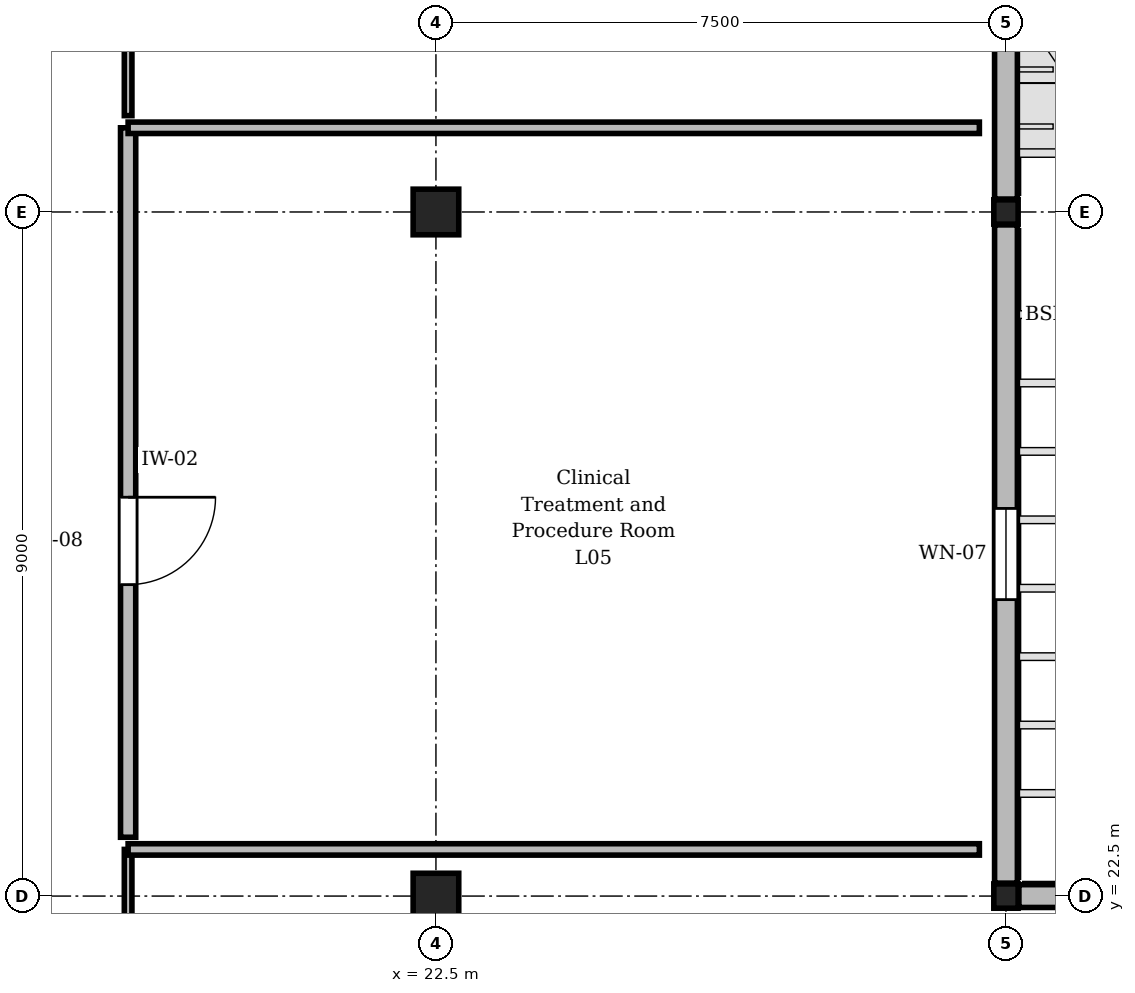
"""IFC4 building model, lengths in metres.
Left out: names, types, materials, properties, quantities, classifications, styles, units other than length and angle.
Written with IfcOpenShell. Run it as: python <this file> out.ifc"""

import sys

from ifc_helpers import new_model, si_unit, direction, frame, frame_2d, origin, origin_2d, place, context, subcontext, project, spatial, rectangle, circle, extrude, element, fill, save


model = new_model("IFC4")
c1 = context("Model", 3, precision=1e-05, world=origin(), true_north=direction((0.0, 1.0)))
c2 = subcontext(c1, "Body", "Model", "MODEL_VIEW")
j1 = project(units=[si_unit("LENGTHUNIT", "METRE"), si_unit("PLANEANGLEUNIT", "RADIAN")], contexts=[c1])
p1 = place(None, origin())
s1 = spatial("IfcSite", under=j1, at=p1, CompositionType="ELEMENT")
p2 = place(p1, origin())
s2 = spatial("IfcBuilding", under=s1, at=p2, CompositionType="ELEMENT")
p3 = place(p2, frame((0.0, 0.0, 21.9)))
s3 = spatial("IfcBuildingStorey", under=s2, at=p3, CompositionType="ELEMENT", Elevation=21.9)
p4 = place(p3, frame((22.5, 22.5, 0.0), z_axis=(0.0, 0.0, 1.0), x_axis=(1.0, 0.0, 0.0)))
e1 = element("IfcColumn", 1, at=p4, inside=s3, PredefinedType="COLUMN", context=c2, shape_type="SweptSolid", body=[
    extrude(circle(Radius=0.3, at=origin_2d()), origin(), (0.0, 0.0, 1.0), 4.05),
])
p5 = place(p3, frame((22.5, 31.5, 0.0), z_axis=(0.0, 0.0, 1.0), x_axis=(1.0, 0.0, 0.0)))
e2 = element("IfcColumn", 2, at=p5, inside=s3, PredefinedType="COLUMN", context=c2, shape_type="SweptSolid", body=[
    extrude(rectangle(XDim=0.6, YDim=0.6, at=origin_2d()), origin(), (0.0, 0.0, 1.0), 4.05),
])
for number, where, z_axis, x_axis in (
    (3, (30.0, 22.5, 0.0), (0.0, 0.0, 1.0), (1.0, 0.0, 0.0)),
    (4, (30.0, 31.5, 0.0), (0.0, 0.0, 1.0), (1.0, 0.0, 0.0)),
):
    element("IfcColumn", number, at=place(p3, frame(where, z_axis=z_axis, x_axis=x_axis)), inside=s3, PredefinedType="COLUMN", context=c2, shape_type="SweptSolid", body=[
        extrude(rectangle(XDim=0.32, YDim=0.32, at=origin_2d()), origin(), (0.0, 0.0, 1.0), 4.05),
    ])
p6 = place(p3, frame((30.0, 31.33, 0.0), z_axis=(0.0, 0.0, 1.0), x_axis=(0.0, -1.0, 0.0)))
e5 = element("IfcWall", 5, at=p6, inside=s3, PredefinedType="STANDARD", context=c2, shape_type="SweptSolid", body=[
    extrude(rectangle(XDim=8.66, YDim=0.3, at=frame_2d((4.33, 0.0))), origin(), (0.0, 0.0, 1.0), 3.22),
])
p7 = place(p6, frame((3.73, 0.0, 0.9)))
e6 = element("IfcOpeningElement", 6, at=p7, cuts=e5, PredefinedType="OPENING", context=c2, shape_type="SweptSolid", body=[
    extrude(rectangle(XDim=1.2, YDim=2.04, at=frame_2d((0.6, 1.02))), frame((0.0, 0.16, 0.0), z_axis=(0.0, -1.0, 0.0), x_axis=(1.0, 0.0, 0.0)), (0.0, 0.0, 1.0), 0.32),
])
p8 = place(p3, frame((30.0, 38.83, 0.0), z_axis=(0.0, 0.0, 1.0), x_axis=(0.0, -1.0, 0.0)))
e7 = element("IfcWall", 7, at=p8, inside=s3, PredefinedType="STANDARD", context=c2, shape_type="SweptSolid", body=[
    extrude(rectangle(XDim=7.16, YDim=0.3, at=frame_2d((3.58, 0.0))), origin(), (0.0, 0.0, 1.0), 3.17),
])
p9 = place(p8, frame((2.53, 0.0, 0.9)))
e8 = element("IfcOpeningElement", 8, at=p9, cuts=e7, PredefinedType="OPENING", context=c2, shape_type="SweptSolid", body=[
    extrude(rectangle(XDim=2.1, YDim=1.99, at=frame_2d((1.05, 0.995))), frame((0.0, 0.16, 0.0), z_axis=(0.0, -1.0, 0.0), x_axis=(1.0, 0.0, 0.0)), (0.0, 0.0, 1.0), 0.32),
])
p10 = place(p3, frame((30.17, 22.5, 0.0), z_axis=(0.0, 0.0, 1.0), x_axis=(1.0, 0.0, 0.0)))
e9 = element("IfcWall", 9, at=p10, inside=s3, PredefinedType="STANDARD", context=c2, shape_type="SweptSolid", body=[
    extrude(rectangle(XDim=7.18, YDim=0.3, at=frame_2d((3.59, 0.0))), origin(), (0.0, 0.0, 1.0), 3.17),
])
p11 = place(p10, frame((2.99, 0.0, 0.9)))
e10 = element("IfcOpeningElement", 10, at=p11, cuts=e9, PredefinedType="OPENING", context=c2, shape_type="SweptSolid", body=[
    extrude(rectangle(XDim=1.2, YDim=1.99, at=frame_2d((0.6, 0.995))), frame((0.0, 0.16, 0.0), z_axis=(0.0, -1.0, 0.0), x_axis=(1.0, 0.0, 0.0)), (0.0, 0.0, 1.0), 0.32),
])
p12 = place(p3, frame((18.45, 23.114, 0.0), z_axis=(0.0, 0.0, 1.0), x_axis=(0.0, -1.0, 0.0)))
e11 = element("IfcWall", 11, at=p12, inside=s3, PredefinedType="PARTITIONING", context=c2, shape_type="SweptSolid", body=[
    extrude(rectangle(XDim=9.334, YDim=0.1, at=frame_2d((4.667, 0.0))), origin(), (0.0, 0.0, 1.0), 3.355),
])
p13 = place(p12, frame((4.092, 0.0, 0.0)))
e12 = element("IfcOpeningElement", 12, at=p13, cuts=e11, PredefinedType="OPENING", context=c2, shape_type="SweptSolid", body=[
    extrude(rectangle(XDim=1.15, YDim=2.2, at=frame_2d((0.575, 1.1))), frame((0.0, 0.06, 0.0), z_axis=(0.0, -1.0, 0.0), x_axis=(1.0, 0.0, 0.0)), (0.0, 0.0, 1.0), 0.12),
])
p14 = place(p3, frame((18.45, 32.607, 0.0), z_axis=(0.0, 0.0, 1.0), x_axis=(0.0, -1.0, 0.0)))
e13 = element("IfcWall", 13, at=p14, inside=s3, PredefinedType="STANDARD", context=c2, shape_type="SweptSolid", body=[
    extrude(rectangle(XDim=9.334, YDim=0.2, at=frame_2d((4.667, 0.0))), origin(), (0.0, 0.0, 1.0), 3.355),
])
p15 = place(p14, frame((4.86, 0.0, 0.0)))
e14 = element("IfcOpeningElement", 14, at=p15, cuts=e13, PredefinedType="OPENING", context=c2, shape_type="SweptSolid", body=[
    extrude(rectangle(XDim=1.15, YDim=2.2, at=frame_2d((0.575, 1.1))), frame((0.0, 0.11, 0.0), z_axis=(0.0, -1.0, 0.0), x_axis=(1.0, 0.0, 0.0)), (0.0, 0.0, 1.0), 0.22),
])
p16 = place(p3, frame((18.45, 42.101, 0.0), z_axis=(0.0, 0.0, 1.0), x_axis=(0.0, -1.0, 0.0)))
e15 = element("IfcWall", 15, at=p16, inside=s3, PredefinedType="PARTITIONING", context=c2, shape_type="SweptSolid", body=[
    extrude(rectangle(XDim=9.334, YDim=0.1, at=frame_2d((4.667, 0.0))), origin(), (0.0, 0.0, 1.0), 3.755),
])
p17 = place(p16, frame((6.477, 0.0, 0.0)))
e16 = element("IfcOpeningElement", 16, at=p17, cuts=e15, PredefinedType="OPENING", context=c2, shape_type="SweptSolid", body=[
    extrude(rectangle(XDim=1.05, YDim=2.2, at=frame_2d((0.525, 1.1))), frame((0.0, 0.06, 0.0), z_axis=(0.0, -1.0, 0.0), x_axis=(1.0, 0.0, 0.0)), (0.0, 0.0, 1.0), 0.12),
])
for number, where, z_axis, x_axis in (
    (17, (18.45, 23.114, 0.0), (0.0, 0.0, 1.0), (1.0, 0.0, 0.0)),
    (18, (18.45, 32.607, 0.0), (0.0, 0.0, 1.0), (1.0, 0.0, 0.0)),
):
    element("IfcWall", number, at=place(p3, frame(where, z_axis=z_axis, x_axis=x_axis)), inside=s3, PredefinedType="PARTITIONING", context=c2, shape_type="SweptSolid", body=[
        extrude(rectangle(XDim=11.2, YDim=0.15, at=frame_2d((5.6, 0.0))), origin(), (0.0, 0.0, 1.0), 3.755),
    ])
p18 = place(p7, origin())
e19 = element("IfcWindow", 19, at=p18, inside=s3, PartitioningType="SINGLE_PANEL", PredefinedType="WINDOW", context=c2, shape_type="SweptSolid", body=[
    extrude(rectangle(XDim=1.2, YDim=2.04, at=frame_2d((0.6, 1.02))), frame((0.0, 0.03, 0.0), z_axis=(0.0, -1.0, 0.0), x_axis=(1.0, 0.0, 0.0)), (0.0, 0.0, 1.0), 0.06),
])
fill(e6, e19)
p19 = place(p15, origin())
e20 = element("IfcDoor", 20, at=p19, inside=s3, OperationType="SINGLE_SWING_LEFT", PredefinedType="DOOR", context=c2, shape_type="SweptSolid", body=[
    extrude(rectangle(XDim=1.15, YDim=2.2, at=frame_2d((0.575, 1.1))), frame((0.0, 0.025, 0.0), z_axis=(0.0, -1.0, 0.0), x_axis=(1.0, 0.0, 0.0)), (0.0, 0.0, 1.0), 0.05),
])
fill(e14, e20)
save(model, sys.argv[1])
